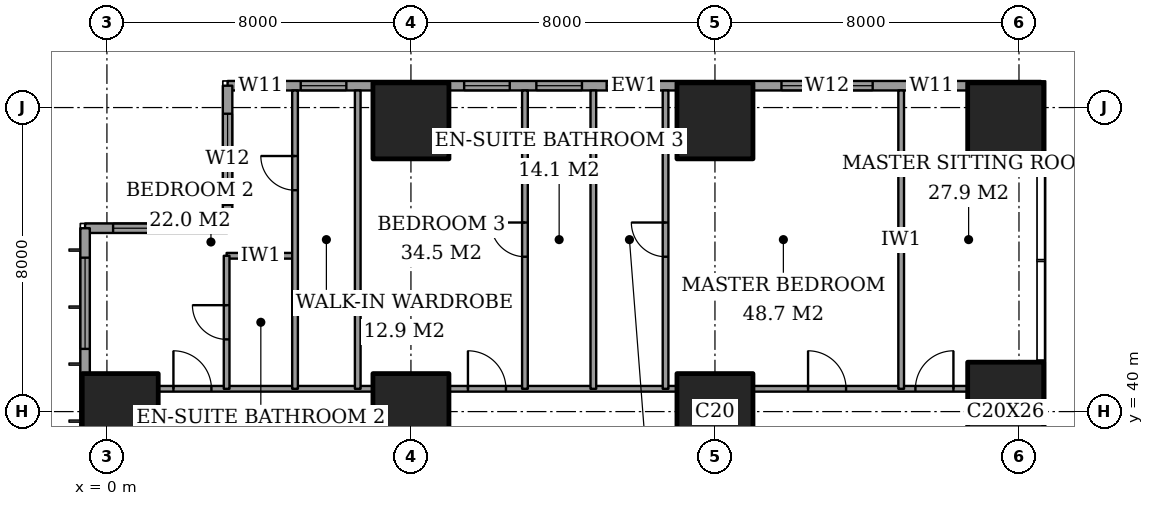
"""IFC4 building model, lengths in metres.
Left out: names, types, materials, properties, quantities, classifications, styles, units other than length and angle.
Written with IfcOpenShell. Run it as: python <this file> out.ifc"""

import sys

from ifc_helpers import new_model, si_unit, direction, frame, frame_2d, origin, origin_2d, place, context, subcontext, project, spatial, rectangle, extrude, element, fill, save


model = new_model("IFC4")
c1 = context("Model", 3, precision=1e-05, world=origin(), true_north=direction((0.0, 1.0)))
c2 = subcontext(c1, "Body", "Model", "MODEL_VIEW")
j1 = project(units=[si_unit("LENGTHUNIT", "METRE"), si_unit("PLANEANGLEUNIT", "RADIAN")], contexts=[c1])
p1 = place(None, origin())
s1 = spatial("IfcSite", under=j1, at=p1, CompositionType="ELEMENT")
p2 = place(p1, origin())
s2 = spatial("IfcBuilding", under=s1, at=p2, CompositionType="ELEMENT")
p3 = place(p2, frame((0.0, 0.0, 121.4)))
s3 = spatial("IfcBuildingStorey", under=s2, at=p3, CompositionType="ELEMENT", Elevation=121.4)
for number, where, z_axis, x_axis in (
    (1, (0.35, 40.0, 0.0), (0.0, 0.0, 1.0), (1.0, 0.0, 0.0)),
    (2, (8.0, 40.0, 0.0), (0.0, 0.0, 1.0), (1.0, 0.0, 0.0)),
    (3, (8.0, 47.65, 0.0), (0.0, 0.0, 1.0), (1.0, 0.0, 0.0)),
    (4, (16.0, 40.0, 0.0), (0.0, 0.0, 1.0), (1.0, 0.0, 0.0)),
    (5, (16.0, 47.65, 0.0), (0.0, 0.0, 1.0), (1.0, 0.0, 0.0)),
):
    element("IfcColumn", number, at=place(p3, frame(where, z_axis=z_axis, x_axis=x_axis)), inside=s3, PredefinedType="COLUMN", context=c2, shape_type="SweptSolid", body=[
        extrude(rectangle(XDim=2.0, YDim=2.0, at=origin_2d()), origin(), (0.0, 0.0, 1.0), 3.6),
    ])
p4 = place(p3, frame((23.65, 40.0, 0.0), z_axis=(0.0, 0.0, 1.0), x_axis=(1.0, 0.0, 0.0)))
e6 = element("IfcColumn", 6, at=p4, inside=s3, PredefinedType="COLUMN", context=c2, shape_type="SweptSolid", body=[
    extrude(rectangle(XDim=2.0, YDim=2.6, at=origin_2d()), origin(), (0.0, 0.0, 1.0), 3.6),
])
p5 = place(p3, frame((23.65, 47.65, 0.0), z_axis=(0.0, 0.0, 1.0), x_axis=(1.0, 0.0, 0.0)))
e7 = element("IfcColumn", 7, at=p5, inside=s3, PredefinedType="COLUMN", context=c2, shape_type="SweptSolid", body=[
    extrude(rectangle(XDim=2.0, YDim=2.0, at=origin_2d()), origin(), (0.0, 0.0, 1.0), 3.6),
])
p6 = place(p3, frame((24.575, 48.575, 0.0), z_axis=(0.0, 0.0, 1.0), x_axis=(-1.0, 0.0, 0.0)))
e8 = element("IfcWall", 8, at=p6, inside=s3, PredefinedType="SOLIDWALL", context=c2, shape_type="SweptSolid", body=[
    extrude(rectangle(XDim=21.4, YDim=0.25, at=frame_2d((10.7, 0.0))), origin(), (0.0, 0.0, 1.0), 3.6),
])
p7 = place(p6, frame((2.275, 0.0, 0.4)))
e9 = element("IfcOpeningElement", 9, at=p7, cuts=e8, PredefinedType="OPENING", context=c2, shape_type="SweptSolid", body=[
    extrude(rectangle(XDim=1.2, YDim=2.2, at=frame_2d((0.6, 1.1))), frame((0.0, 0.135, 0.0), z_axis=(0.0, -1.0, 0.0), x_axis=(1.0, 0.0, 0.0)), (0.0, 0.0, 1.0), 0.27),
])
p8 = place(p6, frame((4.425, 0.0, 0.4)))
e10 = element("IfcOpeningElement", 10, at=p8, cuts=e8, PredefinedType="OPENING", context=c2, shape_type="SweptSolid", body=[
    extrude(rectangle(XDim=2.4, YDim=2.2, at=frame_2d((1.2, 1.1))), frame((0.0, 0.135, 0.0), z_axis=(0.0, -1.0, 0.0), x_axis=(1.0, 0.0, 0.0)), (0.0, 0.0, 1.0), 0.27),
])
p9 = place(p6, frame((10.225, 0.0, 0.4)))
e11 = element("IfcOpeningElement", 11, at=p9, cuts=e8, PredefinedType="OPENING", context=c2, shape_type="SweptSolid", body=[
    extrude(rectangle(XDim=1.2, YDim=2.2, at=frame_2d((0.6, 1.1))), frame((0.0, 0.135, 0.0), z_axis=(0.0, -1.0, 0.0), x_axis=(1.0, 0.0, 0.0)), (0.0, 0.0, 1.0), 0.27),
])
p10 = place(p6, frame((12.075, 0.0, 0.4)))
e12 = element("IfcOpeningElement", 12, at=p10, cuts=e8, PredefinedType="OPENING", context=c2, shape_type="SweptSolid", body=[
    extrude(rectangle(XDim=1.2, YDim=2.2, at=frame_2d((0.6, 1.1))), frame((0.0, 0.135, 0.0), z_axis=(0.0, -1.0, 0.0), x_axis=(1.0, 0.0, 0.0)), (0.0, 0.0, 1.0), 0.27),
])
p11 = place(p6, frame((13.975, 0.0, 0.4)))
e13 = element("IfcOpeningElement", 13, at=p11, cuts=e8, PredefinedType="OPENING", context=c2, shape_type="SweptSolid", body=[
    extrude(rectangle(XDim=1.2, YDim=2.2, at=frame_2d((0.6, 1.1))), frame((0.0, 0.135, 0.0), z_axis=(0.0, -1.0, 0.0), x_axis=(1.0, 0.0, 0.0)), (0.0, 0.0, 1.0), 0.27),
])
p12 = place(p6, frame((18.275, 0.0, 0.4)))
e14 = element("IfcOpeningElement", 14, at=p12, cuts=e8, PredefinedType="OPENING", context=c2, shape_type="SweptSolid", body=[
    extrude(rectangle(XDim=1.2, YDim=2.2, at=frame_2d((0.6, 1.1))), frame((0.0, 0.135, 0.0), z_axis=(0.0, -1.0, 0.0), x_axis=(1.0, 0.0, 0.0)), (0.0, 0.0, 1.0), 0.27),
])
p13 = place(p6, frame((19.925, 0.0, 0.4)))
e15 = element("IfcOpeningElement", 15, at=p13, cuts=e8, PredefinedType="OPENING", context=c2, shape_type="SweptSolid", body=[
    extrude(rectangle(XDim=1.2, YDim=2.2, at=frame_2d((0.6, 1.1))), frame((0.0, 0.135, 0.0), z_axis=(0.0, -1.0, 0.0), x_axis=(1.0, 0.0, 0.0)), (0.0, 0.0, 1.0), 0.27),
])
p14 = place(p3, frame((3.175, 48.575, 0.0), z_axis=(0.0, 0.0, 1.0), x_axis=(0.0, -1.0, 0.0)))
e16 = element("IfcWall", 16, at=p14, inside=s3, PredefinedType="SOLIDWALL", context=c2, shape_type="SweptSolid", body=[
    extrude(rectangle(XDim=3.75, YDim=0.25, at=frame_2d((1.875, 0.0))), origin(), (0.0, 0.0, 1.0), 3.6),
])
p15 = place(p14, frame((0.738, 0.0, 0.4)))
e17 = element("IfcOpeningElement", 17, at=p15, cuts=e16, PredefinedType="OPENING", context=c2, shape_type="SweptSolid", body=[
    extrude(rectangle(XDim=2.4, YDim=2.2, at=frame_2d((1.2, 1.1))), frame((0.0, 0.135, 0.0), z_axis=(0.0, -1.0, 0.0), x_axis=(1.0, 0.0, 0.0)), (0.0, 0.0, 1.0), 0.27),
])
p16 = place(p3, frame((3.175, 44.825, 0.0), z_axis=(0.0, 0.0, 1.0), x_axis=(-1.0, 0.0, 0.0)))
e18 = element("IfcWall", 18, at=p16, inside=s3, PredefinedType="SOLIDWALL", context=c2, shape_type="SweptSolid", body=[
    extrude(rectangle(XDim=3.75, YDim=0.25, at=frame_2d((1.875, 0.0))), origin(), (0.0, 0.0, 1.0), 3.6),
])
p17 = place(p16, frame((0.613, 0.0, 0.4)))
e19 = element("IfcOpeningElement", 19, at=p17, cuts=e18, PredefinedType="OPENING", context=c2, shape_type="SweptSolid", body=[
    extrude(rectangle(XDim=2.4, YDim=2.2, at=frame_2d((1.2, 1.1))), frame((0.0, 0.135, 0.0), z_axis=(0.0, -1.0, 0.0), x_axis=(1.0, 0.0, 0.0)), (0.0, 0.0, 1.0), 0.27),
])
p18 = place(p3, frame((-0.575, 44.825, 0.0), z_axis=(0.0, 0.0, 1.0), x_axis=(0.0, -1.0, 0.0)))
e20 = element("IfcWall", 20, at=p18, inside=s3, PredefinedType="SOLIDWALL", context=c2, shape_type="SweptSolid", body=[
    extrude(rectangle(XDim=41.65, YDim=0.25, at=frame_2d((20.825, 0.0))), origin(), (0.0, 0.0, 1.0), 3.6),
])
p19 = place(p18, frame((0.775, 0.0, 0.4)))
e21 = element("IfcOpeningElement", 21, at=p19, cuts=e20, PredefinedType="OPENING", context=c2, shape_type="SweptSolid", body=[
    extrude(rectangle(XDim=2.4, YDim=2.2, at=frame_2d((1.2, 1.1))), frame((0.0, 0.135, 0.0), z_axis=(0.0, -1.0, 0.0), x_axis=(1.0, 0.0, 0.0)), (0.0, 0.0, 1.0), 0.27),
])
p20 = place(p18, frame((6.1, 0.0, 0.4)))
e22 = element("IfcOpeningElement", 22, at=p20, cuts=e20, PredefinedType="OPENING", context=c2, shape_type="SweptSolid", body=[
    extrude(rectangle(XDim=1.2, YDim=2.2, at=frame_2d((0.6, 1.1))), frame((0.0, 0.135, 0.0), z_axis=(0.0, -1.0, 0.0), x_axis=(1.0, 0.0, 0.0)), (0.0, 0.0, 1.0), 0.27),
])
p21 = place(p18, frame((8.225, 0.0, 0.4)))
e23 = element("IfcOpeningElement", 23, at=p21, cuts=e20, PredefinedType="OPENING", context=c2, shape_type="SweptSolid", body=[
    extrude(rectangle(XDim=2.4, YDim=2.2, at=frame_2d((1.2, 1.1))), frame((0.0, 0.135, 0.0), z_axis=(0.0, -1.0, 0.0), x_axis=(1.0, 0.0, 0.0)), (0.0, 0.0, 1.0), 0.27),
])
p22 = place(p18, frame((15.625, 0.0, 0.4)))
e24 = element("IfcOpeningElement", 24, at=p22, cuts=e20, PredefinedType="OPENING", context=c2, shape_type="SweptSolid", body=[
    extrude(rectangle(XDim=2.4, YDim=2.2, at=frame_2d((1.2, 1.1))), frame((0.0, 0.135, 0.0), z_axis=(0.0, -1.0, 0.0), x_axis=(1.0, 0.0, 0.0)), (0.0, 0.0, 1.0), 0.27),
])
p23 = place(p18, frame((23.625, 0.0, 0.4)))
e25 = element("IfcOpeningElement", 25, at=p23, cuts=e20, PredefinedType="OPENING", context=c2, shape_type="SweptSolid", body=[
    extrude(rectangle(XDim=2.4, YDim=2.2, at=frame_2d((1.2, 1.1))), frame((0.0, 0.135, 0.0), z_axis=(0.0, -1.0, 0.0), x_axis=(1.0, 0.0, 0.0)), (0.0, 0.0, 1.0), 0.27),
])
p24 = place(p18, frame((30.825, 0.0, 0.4)))
e26 = element("IfcOpeningElement", 26, at=p24, cuts=e20, PredefinedType="OPENING", context=c2, shape_type="SweptSolid", body=[
    extrude(rectangle(XDim=2.4, YDim=2.2, at=frame_2d((1.2, 1.1))), frame((0.0, 0.135, 0.0), z_axis=(0.0, -1.0, 0.0), x_axis=(1.0, 0.0, 0.0)), (0.0, 0.0, 1.0), 0.27),
])
p25 = place(p18, frame((34.5, 0.0, 0.4)))
e27 = element("IfcOpeningElement", 27, at=p25, cuts=e20, PredefinedType="OPENING", context=c2, shape_type="SweptSolid", body=[
    extrude(rectangle(XDim=1.2, YDim=2.2, at=frame_2d((0.6, 1.1))), frame((0.0, 0.135, 0.0), z_axis=(0.0, -1.0, 0.0), x_axis=(1.0, 0.0, 0.0)), (0.0, 0.0, 1.0), 0.27),
])
p26 = place(p18, frame((38.475, 0.0, 0.4)))
e28 = element("IfcOpeningElement", 28, at=p26, cuts=e20, PredefinedType="OPENING", context=c2, shape_type="SweptSolid", body=[
    extrude(rectangle(XDim=2.4, YDim=2.2, at=frame_2d((1.2, 1.1))), frame((0.0, 0.135, 0.0), z_axis=(0.0, -1.0, 0.0), x_axis=(1.0, 0.0, 0.0)), (0.0, 0.0, 1.0), 0.27),
])
p27 = place(p3, frame((1.35, 40.6, 0.0), z_axis=(0.0, 0.0, 1.0), x_axis=(1.0, 0.0, 0.0)))
e29 = element("IfcWall", 29, at=p27, inside=s3, PredefinedType="PARTITIONING", context=c2, shape_type="SweptSolid", body=[
    extrude(rectangle(XDim=5.65, YDim=0.15, at=frame_2d((2.825, 0.0))), origin(), (0.0, 0.0, 1.0), 3.35),
])
p28 = place(p27, frame((0.4, 0.0, 0.0)))
e30 = element("IfcOpeningElement", 30, at=p28, cuts=e29, PredefinedType="OPENING", context=c2, shape_type="SweptSolid", body=[
    extrude(rectangle(XDim=1.0, YDim=2.1, at=frame_2d((0.5, 1.05))), frame((0.0, 0.085, 0.0), z_axis=(0.0, -1.0, 0.0), x_axis=(1.0, 0.0, 0.0)), (0.0, 0.0, 1.0), 0.17),
])
p29 = place(p3, frame((9.0, 40.6, 0.0), z_axis=(0.0, 0.0, 1.0), x_axis=(1.0, 0.0, 0.0)))
e31 = element("IfcWall", 31, at=p29, inside=s3, PredefinedType="PARTITIONING", context=c2, shape_type="SweptSolid", body=[
    extrude(rectangle(XDim=6.0, YDim=0.15, at=frame_2d((3.0, 0.0))), origin(), (0.0, 0.0, 1.0), 3.35),
])
p30 = place(p29, frame((0.5, 0.0, 0.0)))
e32 = element("IfcOpeningElement", 32, at=p30, cuts=e31, PredefinedType="OPENING", context=c2, shape_type="SweptSolid", body=[
    extrude(rectangle(XDim=1.0, YDim=2.1, at=frame_2d((0.5, 1.05))), frame((0.0, 0.085, 0.0), z_axis=(0.0, -1.0, 0.0), x_axis=(1.0, 0.0, 0.0)), (0.0, 0.0, 1.0), 0.17),
])
p31 = place(p3, frame((17.0, 40.6, 0.0), z_axis=(0.0, 0.0, 1.0), x_axis=(1.0, 0.0, 0.0)))
e33 = element("IfcWall", 33, at=p31, inside=s3, PredefinedType="PARTITIONING", context=c2, shape_type="SweptSolid", body=[
    extrude(rectangle(XDim=5.65, YDim=0.15, at=frame_2d((2.825, 0.0))), origin(), (0.0, 0.0, 1.0), 3.35),
])
p32 = place(p31, frame((1.45, 0.0, 0.0)))
e34 = element("IfcOpeningElement", 34, at=p32, cuts=e33, PredefinedType="OPENING", context=c2, shape_type="SweptSolid", body=[
    extrude(rectangle(XDim=1.0, YDim=2.1, at=frame_2d((0.5, 1.05))), frame((0.0, 0.085, 0.0), z_axis=(0.0, -1.0, 0.0), x_axis=(1.0, 0.0, 0.0)), (0.0, 0.0, 1.0), 0.17),
])
p33 = place(p31, frame((4.275, 0.0, 0.0)))
e35 = element("IfcOpeningElement", 35, at=p33, cuts=e33, PredefinedType="OPENING", context=c2, shape_type="SweptSolid", body=[
    extrude(rectangle(XDim=1.0, YDim=2.1, at=frame_2d((0.5, 1.05))), frame((0.0, 0.085, 0.0), z_axis=(0.0, -1.0, 0.0), x_axis=(1.0, 0.0, 0.0)), (0.0, 0.0, 1.0), 0.17),
])
p34 = place(p3, frame((3.15, 44.1, 0.0), z_axis=(0.0, 0.0, 1.0), x_axis=(1.0, 0.0, 0.0)))
e36 = element("IfcWall", 36, at=p34, inside=s3, PredefinedType="PARTITIONING", context=c2, shape_type="SweptSolid", body=[
    extrude(rectangle(XDim=1.8, YDim=0.15, at=frame_2d((0.9, 0.0))), origin(), (0.0, 0.0, 1.0), 3.35),
])
p35 = place(p3, frame((3.15, 40.6, 0.0), z_axis=(0.0, 0.0, 1.0), x_axis=(0.0, 1.0, 0.0)))
e37 = element("IfcWall", 37, at=p35, inside=s3, PredefinedType="PARTITIONING", context=c2, shape_type="SweptSolid", body=[
    extrude(rectangle(XDim=3.5, YDim=0.15, at=frame_2d((1.75, 0.0))), origin(), (0.0, 0.0, 1.0), 3.35),
])
p36 = place(p35, frame((1.3, 0.0, 0.0)))
e38 = element("IfcOpeningElement", 38, at=p36, cuts=e37, PredefinedType="OPENING", context=c2, shape_type="SweptSolid", body=[
    extrude(rectangle(XDim=0.9, YDim=2.1, at=frame_2d((0.45, 1.05))), frame((0.0, 0.085, 0.0), z_axis=(0.0, -1.0, 0.0), x_axis=(1.0, 0.0, 0.0)), (0.0, 0.0, 1.0), 0.17),
])
p37 = place(p3, frame((4.95, 40.6, 0.0), z_axis=(0.0, 0.0, 1.0), x_axis=(0.0, 1.0, 0.0)))
e39 = element("IfcWall", 39, at=p37, inside=s3, PredefinedType="PARTITIONING", context=c2, shape_type="SweptSolid", body=[
    extrude(rectangle(XDim=7.85, YDim=0.15, at=frame_2d((3.925, 0.0))), origin(), (0.0, 0.0, 1.0), 3.35),
])
p38 = place(p37, frame((5.225, 0.0, 0.0)))
e40 = element("IfcOpeningElement", 40, at=p38, cuts=e39, PredefinedType="OPENING", context=c2, shape_type="SweptSolid", body=[
    extrude(rectangle(XDim=0.9, YDim=2.1, at=frame_2d((0.45, 1.05))), frame((0.0, 0.085, 0.0), z_axis=(0.0, -1.0, 0.0), x_axis=(1.0, 0.0, 0.0)), (0.0, 0.0, 1.0), 0.17),
])
p39 = place(p3, frame((6.6, 40.6, 0.0), z_axis=(0.0, 0.0, 1.0), x_axis=(0.0, 1.0, 0.0)))
e41 = element("IfcWall", 41, at=p39, inside=s3, PredefinedType="PARTITIONING", context=c2, shape_type="SweptSolid", body=[
    extrude(rectangle(XDim=7.85, YDim=0.15, at=frame_2d((3.925, 0.0))), origin(), (0.0, 0.0, 1.0), 3.35),
])
p40 = place(p3, frame((11.0, 40.6, 0.0), z_axis=(0.0, 0.0, 1.0), x_axis=(0.0, 1.0, 0.0)))
e42 = element("IfcWall", 42, at=p40, inside=s3, PredefinedType="PARTITIONING", context=c2, shape_type="SweptSolid", body=[
    extrude(rectangle(XDim=7.85, YDim=0.15, at=frame_2d((3.925, 0.0))), origin(), (0.0, 0.0, 1.0), 3.35),
])
p41 = place(p40, frame((3.475, 0.0, 0.0)))
e43 = element("IfcOpeningElement", 43, at=p41, cuts=e42, PredefinedType="OPENING", context=c2, shape_type="SweptSolid", body=[
    extrude(rectangle(XDim=0.9, YDim=2.1, at=frame_2d((0.45, 1.05))), frame((0.0, 0.085, 0.0), z_axis=(0.0, -1.0, 0.0), x_axis=(1.0, 0.0, 0.0)), (0.0, 0.0, 1.0), 0.17),
])
p42 = place(p3, frame((12.8, 40.6, 0.0), z_axis=(0.0, 0.0, 1.0), x_axis=(0.0, 1.0, 0.0)))
e44 = element("IfcWall", 44, at=p42, inside=s3, PredefinedType="PARTITIONING", context=c2, shape_type="SweptSolid", body=[
    extrude(rectangle(XDim=7.85, YDim=0.15, at=frame_2d((3.925, 0.0))), origin(), (0.0, 0.0, 1.0), 3.35),
])
p43 = place(p3, frame((14.7, 40.6, 0.0), z_axis=(0.0, 0.0, 1.0), x_axis=(0.0, 1.0, 0.0)))
e45 = element("IfcWall", 45, at=p43, inside=s3, PredefinedType="PARTITIONING", context=c2, shape_type="SweptSolid", body=[
    extrude(rectangle(XDim=7.85, YDim=0.15, at=frame_2d((3.925, 0.0))), origin(), (0.0, 0.0, 1.0), 3.35),
])
p44 = place(p43, frame((3.475, 0.0, 0.0)))
e46 = element("IfcOpeningElement", 46, at=p44, cuts=e45, PredefinedType="OPENING", context=c2, shape_type="SweptSolid", body=[
    extrude(rectangle(XDim=0.9, YDim=2.1, at=frame_2d((0.45, 1.05))), frame((0.0, 0.085, 0.0), z_axis=(0.0, -1.0, 0.0), x_axis=(1.0, 0.0, 0.0)), (0.0, 0.0, 1.0), 0.17),
])
p45 = place(p3, frame((20.9, 40.6, 0.0), z_axis=(0.0, 0.0, 1.0), x_axis=(0.0, 1.0, 0.0)))
e47 = element("IfcWall", 47, at=p45, inside=s3, PredefinedType="PARTITIONING", context=c2, shape_type="SweptSolid", body=[
    extrude(rectangle(XDim=7.85, YDim=0.15, at=frame_2d((3.925, 0.0))), origin(), (0.0, 0.0, 1.0), 3.35),
])
p46 = place(p7, origin())
e48 = element("IfcWindow", 48, at=p46, inside=s3, PartitioningType="SINGLE_PANEL", PredefinedType="WINDOW", context=c2, shape_type="SweptSolid", body=[
    extrude(rectangle(XDim=1.2, YDim=2.2, at=frame_2d((0.6, 1.1))), frame((0.0, 0.03, 0.0), z_axis=(0.0, -1.0, 0.0), x_axis=(1.0, 0.0, 0.0)), (0.0, 0.0, 1.0), 0.06),
])
fill(e9, e48)
p47 = place(p8, origin())
e49 = element("IfcWindow", 49, at=p47, inside=s3, PartitioningType="SINGLE_PANEL", PredefinedType="WINDOW", context=c2, shape_type="SweptSolid", body=[
    extrude(rectangle(XDim=2.4, YDim=2.2, at=frame_2d((1.2, 1.1))), frame((0.0, 0.03, 0.0), z_axis=(0.0, -1.0, 0.0), x_axis=(1.0, 0.0, 0.0)), (0.0, 0.0, 1.0), 0.06),
])
fill(e10, e49)
p48 = place(p9, origin())
e50 = element("IfcWindow", 50, at=p48, inside=s3, PartitioningType="SINGLE_PANEL", PredefinedType="WINDOW", context=c2, shape_type="SweptSolid", body=[
    extrude(rectangle(XDim=1.2, YDim=2.2, at=frame_2d((0.6, 1.1))), frame((0.0, 0.03, 0.0), z_axis=(0.0, -1.0, 0.0), x_axis=(1.0, 0.0, 0.0)), (0.0, 0.0, 1.0), 0.06),
])
fill(e11, e50)
p49 = place(p10, origin())
e51 = element("IfcWindow", 51, at=p49, inside=s3, PartitioningType="SINGLE_PANEL", PredefinedType="WINDOW", context=c2, shape_type="SweptSolid", body=[
    extrude(rectangle(XDim=1.2, YDim=2.2, at=frame_2d((0.6, 1.1))), frame((0.0, 0.03, 0.0), z_axis=(0.0, -1.0, 0.0), x_axis=(1.0, 0.0, 0.0)), (0.0, 0.0, 1.0), 0.06),
])
fill(e12, e51)
p50 = place(p11, origin())
e52 = element("IfcWindow", 52, at=p50, inside=s3, PartitioningType="SINGLE_PANEL", PredefinedType="WINDOW", context=c2, shape_type="SweptSolid", body=[
    extrude(rectangle(XDim=1.2, YDim=2.2, at=frame_2d((0.6, 1.1))), frame((0.0, 0.03, 0.0), z_axis=(0.0, -1.0, 0.0), x_axis=(1.0, 0.0, 0.0)), (0.0, 0.0, 1.0), 0.06),
])
fill(e13, e52)
p51 = place(p12, origin())
e53 = element("IfcWindow", 53, at=p51, inside=s3, PartitioningType="SINGLE_PANEL", PredefinedType="WINDOW", context=c2, shape_type="SweptSolid", body=[
    extrude(rectangle(XDim=1.2, YDim=2.2, at=frame_2d((0.6, 1.1))), frame((0.0, 0.03, 0.0), z_axis=(0.0, -1.0, 0.0), x_axis=(1.0, 0.0, 0.0)), (0.0, 0.0, 1.0), 0.06),
])
fill(e14, e53)
p52 = place(p13, origin())
e54 = element("IfcWindow", 54, at=p52, inside=s3, PartitioningType="SINGLE_PANEL", PredefinedType="WINDOW", context=c2, shape_type="SweptSolid", body=[
    extrude(rectangle(XDim=1.2, YDim=2.2, at=frame_2d((0.6, 1.1))), frame((0.0, 0.03, 0.0), z_axis=(0.0, -1.0, 0.0), x_axis=(1.0, 0.0, 0.0)), (0.0, 0.0, 1.0), 0.06),
])
fill(e15, e54)
p53 = place(p15, origin())
e55 = element("IfcWindow", 55, at=p53, inside=s3, PartitioningType="SINGLE_PANEL", PredefinedType="WINDOW", context=c2, shape_type="SweptSolid", body=[
    extrude(rectangle(XDim=2.4, YDim=2.2, at=frame_2d((1.2, 1.1))), frame((0.0, 0.03, 0.0), z_axis=(0.0, -1.0, 0.0), x_axis=(1.0, 0.0, 0.0)), (0.0, 0.0, 1.0), 0.06),
])
fill(e17, e55)
p54 = place(p17, origin())
e56 = element("IfcWindow", 56, at=p54, inside=s3, PartitioningType="SINGLE_PANEL", PredefinedType="WINDOW", context=c2, shape_type="SweptSolid", body=[
    extrude(rectangle(XDim=2.4, YDim=2.2, at=frame_2d((1.2, 1.1))), frame((0.0, 0.03, 0.0), z_axis=(0.0, -1.0, 0.0), x_axis=(1.0, 0.0, 0.0)), (0.0, 0.0, 1.0), 0.06),
])
fill(e19, e56)
p55 = place(p19, origin())
e57 = element("IfcWindow", 57, at=p55, inside=s3, PartitioningType="SINGLE_PANEL", PredefinedType="WINDOW", context=c2, shape_type="SweptSolid", body=[
    extrude(rectangle(XDim=2.4, YDim=2.2, at=frame_2d((1.2, 1.1))), frame((0.0, 0.03, 0.0), z_axis=(0.0, -1.0, 0.0), x_axis=(1.0, 0.0, 0.0)), (0.0, 0.0, 1.0), 0.06),
])
fill(e21, e57)
p56 = place(p36, origin())
e58 = element("IfcDoor", 58, at=p56, inside=s3, OperationType="SINGLE_SWING_LEFT", PredefinedType="DOOR", context=c2, shape_type="SweptSolid", body=[
    extrude(rectangle(XDim=0.9, YDim=2.1, at=frame_2d((0.45, 1.05))), frame((0.0, 0.025, 0.0), z_axis=(0.0, -1.0, 0.0), x_axis=(1.0, 0.0, 0.0)), (0.0, 0.0, 1.0), 0.05),
])
fill(e38, e58)
p57 = place(p28, origin())
e59 = element("IfcDoor", 59, at=p57, inside=s3, OperationType="SINGLE_SWING_RIGHT", PredefinedType="DOOR", context=c2, shape_type="SweptSolid", body=[
    extrude(rectangle(XDim=1.0, YDim=2.1, at=frame_2d((0.5, 1.05))), frame((0.0, 0.025, 0.0), z_axis=(0.0, -1.0, 0.0), x_axis=(1.0, 0.0, 0.0)), (0.0, 0.0, 1.0), 0.05),
])
fill(e30, e59)
p58 = place(p38, origin())
e60 = element("IfcDoor", 60, at=p58, inside=s3, OperationType="SINGLE_SWING_LEFT", PredefinedType="DOOR", context=c2, shape_type="SweptSolid", body=[
    extrude(rectangle(XDim=0.9, YDim=2.1, at=frame_2d((0.45, 1.05))), frame((0.0, 0.025, 0.0), z_axis=(0.0, -1.0, 0.0), x_axis=(1.0, 0.0, 0.0)), (0.0, 0.0, 1.0), 0.05),
])
fill(e40, e60)
p59 = place(p30, origin())
e61 = element("IfcDoor", 61, at=p59, inside=s3, OperationType="SINGLE_SWING_RIGHT", PredefinedType="DOOR", context=c2, shape_type="SweptSolid", body=[
    extrude(rectangle(XDim=1.0, YDim=2.1, at=frame_2d((0.5, 1.05))), frame((0.0, 0.025, 0.0), z_axis=(0.0, -1.0, 0.0), x_axis=(1.0, 0.0, 0.0)), (0.0, 0.0, 1.0), 0.05),
])
fill(e32, e61)
p60 = place(p41, origin())
e62 = element("IfcDoor", 62, at=p60, inside=s3, OperationType="SINGLE_SWING_LEFT", PredefinedType="DOOR", context=c2, shape_type="SweptSolid", body=[
    extrude(rectangle(XDim=0.9, YDim=2.1, at=frame_2d((0.45, 1.05))), frame((0.0, 0.025, 0.0), z_axis=(0.0, -1.0, 0.0), x_axis=(1.0, 0.0, 0.0)), (0.0, 0.0, 1.0), 0.05),
])
fill(e43, e62)
p61 = place(p44, origin())
e63 = element("IfcDoor", 63, at=p61, inside=s3, OperationType="SINGLE_SWING_LEFT", PredefinedType="DOOR", context=c2, shape_type="SweptSolid", body=[
    extrude(rectangle(XDim=0.9, YDim=2.1, at=frame_2d((0.45, 1.05))), frame((0.0, 0.025, 0.0), z_axis=(0.0, -1.0, 0.0), x_axis=(1.0, 0.0, 0.0)), (0.0, 0.0, 1.0), 0.05),
])
fill(e46, e63)
p62 = place(p32, origin())
e64 = element("IfcDoor", 64, at=p62, inside=s3, OperationType="SINGLE_SWING_RIGHT", PredefinedType="DOOR", context=c2, shape_type="SweptSolid", body=[
    extrude(rectangle(XDim=1.0, YDim=2.1, at=frame_2d((0.5, 1.05))), frame((0.0, 0.025, 0.0), z_axis=(0.0, -1.0, 0.0), x_axis=(1.0, 0.0, 0.0)), (0.0, 0.0, 1.0), 0.05),
])
fill(e34, e64)
p63 = place(p33, origin())
e65 = element("IfcDoor", 65, at=p63, inside=s3, OperationType="SINGLE_SWING_LEFT", PredefinedType="DOOR", context=c2, shape_type="SweptSolid", body=[
    extrude(rectangle(XDim=1.0, YDim=2.1, at=frame_2d((0.5, 1.05))), frame((0.0, 0.025, 0.0), z_axis=(0.0, -1.0, 0.0), x_axis=(1.0, 0.0, 0.0)), (0.0, 0.0, 1.0), 0.05),
])
fill(e35, e65)
save(model, sys.argv[1])
